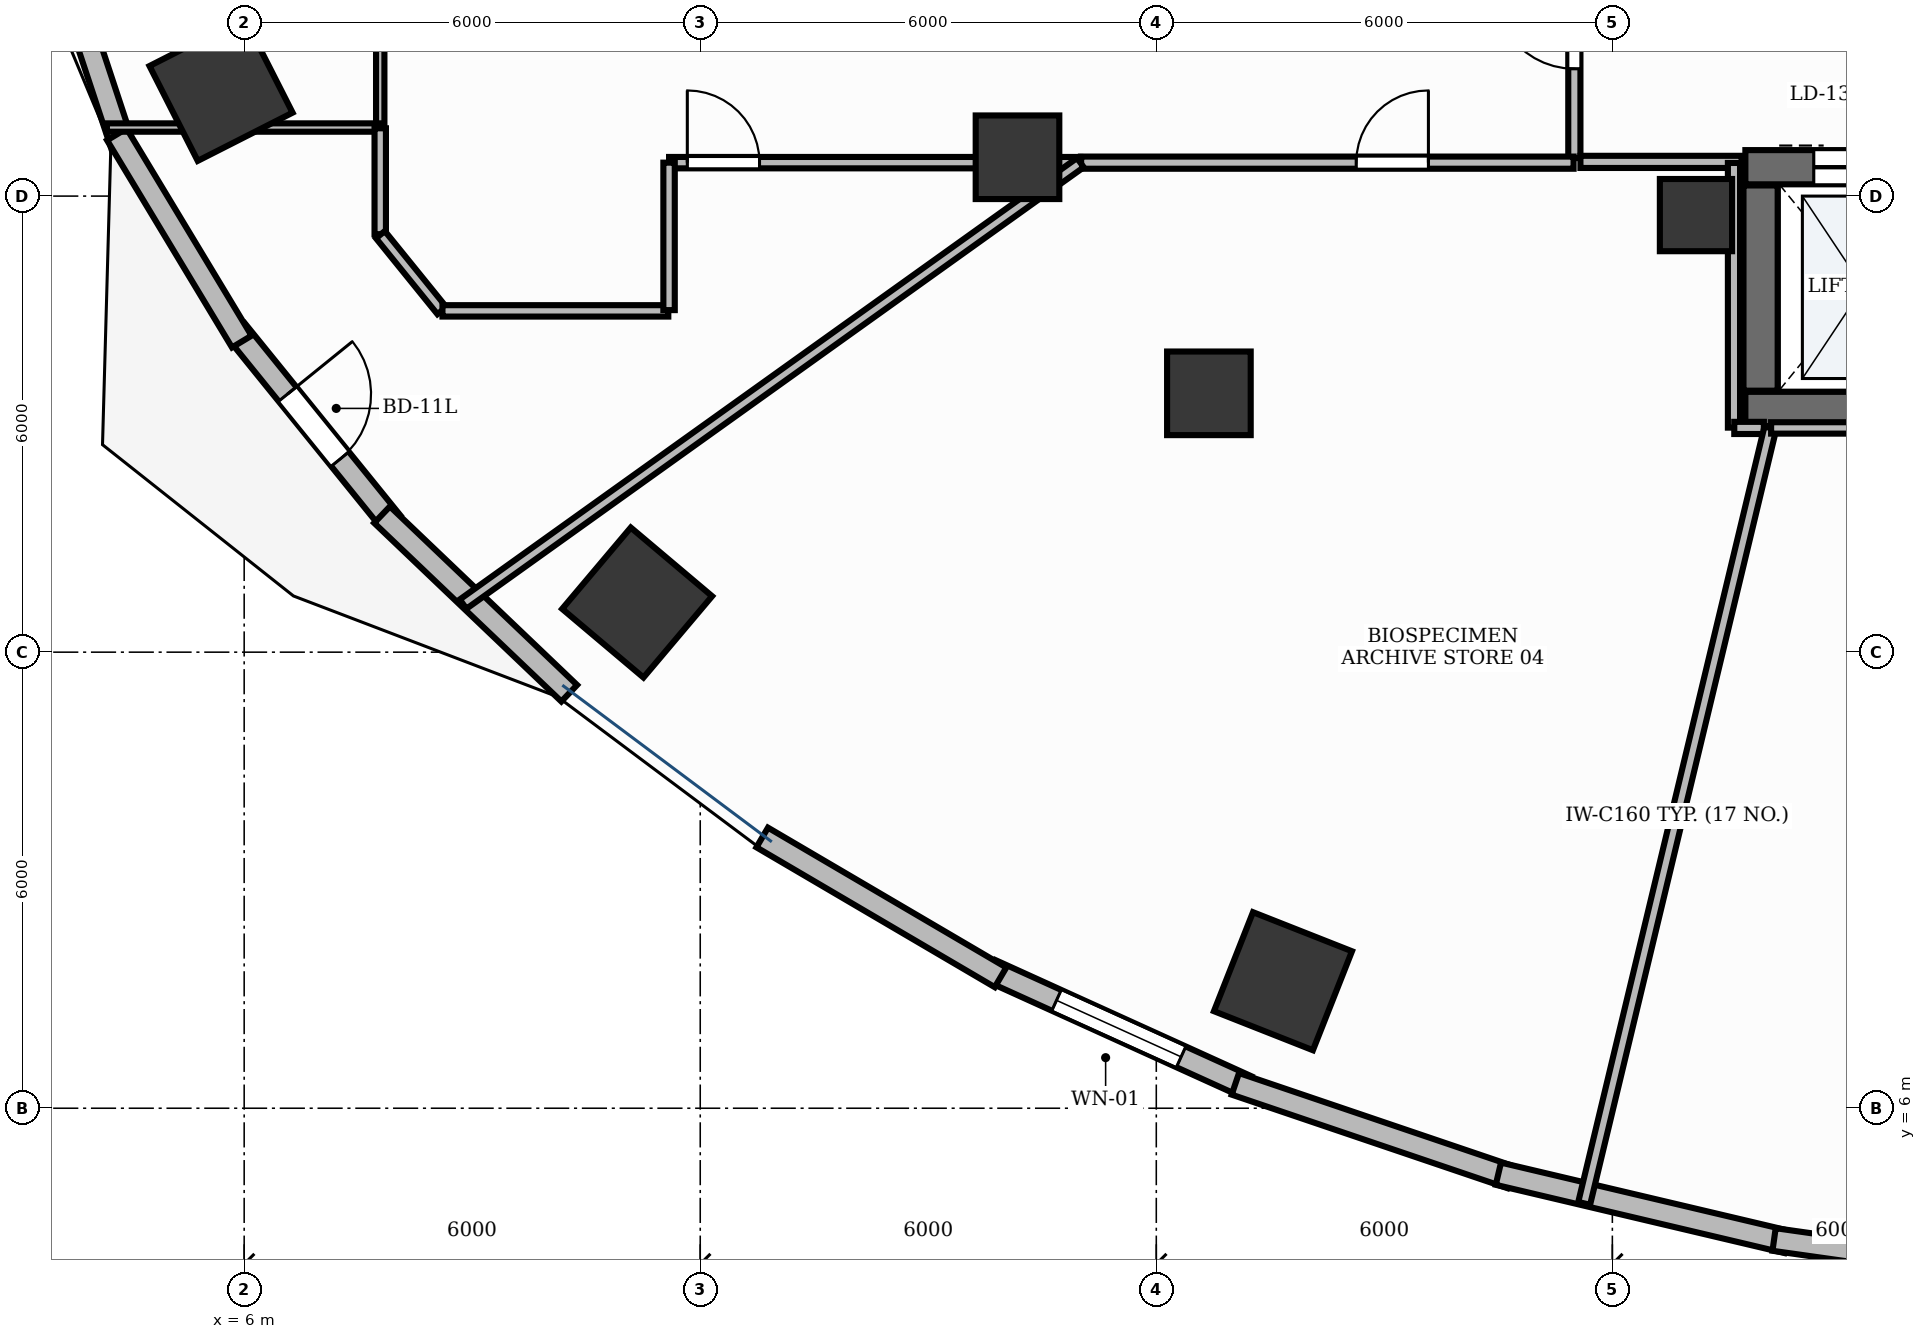
"""IFC4 building model, lengths in metres.
Left out: names, types, materials, properties, quantities, classifications, styles, units other than length and angle.
Written with IfcOpenShell. Run it as: python <this file> out.ifc"""

import sys

from ifc_helpers import new_model, si_unit, direction, frame, frame_2d, origin, origin_2d, place, context, subcontext, project, spatial, rectangle, extrude, element, fill, save


model = new_model("IFC4")
c1 = context("Model", 3, precision=1e-05, world=origin(), true_north=direction((0.0, 1.0)))
c2 = subcontext(c1, "Body", "Model", "MODEL_VIEW")
j1 = project(units=[si_unit("LENGTHUNIT", "METRE"), si_unit("PLANEANGLEUNIT", "RADIAN")], contexts=[c1])
p1 = place(None, origin())
s1 = spatial("IfcSite", under=j1, at=p1, CompositionType="ELEMENT")
p2 = place(p1, origin())
s2 = spatial("IfcBuilding", under=s1, at=p2, CompositionType="ELEMENT")
p3 = place(p2, frame((0.0, 0.0, 30.0)))
s3 = spatial("IfcBuildingStorey", under=s2, at=p3, CompositionType="ELEMENT", Elevation=30.0)
p4 = place(p3, frame((25.75, 15.2, 0.0), z_axis=(0.0, 0.0, 1.0), x_axis=(1.0, 0.0, 0.0)))
e1 = element("IfcWall", 1, at=p4, inside=s3, PredefinedType="SHEAR", context=c2, shape_type="SweptSolid", body=[
    extrude(rectangle(XDim=3.1, YDim=0.45, at=frame_2d((1.55, 0.0))), origin(), (0.0, 0.0, 1.0), 3.9),
])
p5 = place(p3, frame((25.75, 18.38, 0.0), z_axis=(0.0, 0.0, 1.0), x_axis=(1.0, 0.0, 0.0)))
e2 = element("IfcWall", 2, at=p5, inside=s3, PredefinedType="SHEAR", context=c2, shape_type="SweptSolid", body=[
    extrude(rectangle(XDim=3.1, YDim=0.45, at=frame_2d((1.55, 0.0))), origin(), (0.0, 0.0, 1.0), 3.9),
])
p6 = place(p5, frame((0.9, 0.0, 0.0)))
e3 = element("IfcOpeningElement", 3, at=p6, cuts=e2, PredefinedType="OPENING", context=c2, shape_type="SweptSolid", body=[
    extrude(rectangle(XDim=1.3, YDim=2.2, at=frame_2d((0.65, 1.1))), frame((0.0, 0.24, 0.0), z_axis=(0.0, -1.0, 0.0), x_axis=(1.0, 0.0, 0.0)), (0.0, 0.0, 1.0), 0.48),
])
p7 = place(p3, frame((25.95, 15.44, 0.0), z_axis=(0.0, 0.0, 1.0), x_axis=(0.0, 1.0, 0.0)))
e4 = element("IfcWall", 4, at=p7, inside=s3, PredefinedType="SHEAR", context=c2, shape_type="SweptSolid", body=[
    extrude(rectangle(XDim=2.7, YDim=0.45, at=frame_2d((1.35, 0.0))), origin(), (0.0, 0.0, 1.0), 3.9),
])
p8 = place(p3, frame((25.1, 17.75, -0.0), z_axis=(0.0, 0.0, 1.0), x_axis=(1.0, 0.0, 0.0)))
e5 = element("IfcColumn", 5, at=p8, inside=s3, PredefinedType="PILASTER", context=c2, shape_type="SweptSolid", body=[
    extrude(rectangle(XDim=0.95, YDim=0.95, at=origin_2d()), origin(), (0.0, 0.0, 1.0), 3.901),
])
p9 = place(p3, frame((5.696, 19.404, -0.0), z_axis=(0.0, 0.0, 1.0), x_axis=(-0.453057191132, 0.891481453292, 0.0)))
e6 = element("IfcColumn", 6, at=p9, inside=s3, PredefinedType="COLUMN", context=c2, shape_type="SweptSolid", body=[
    extrude(rectangle(XDim=1.4, YDim=1.4, at=origin_2d()), origin(), (0.0, 0.0, 1.0), 3.901),
])
p10 = place(p3, frame((16.174, 18.511, -0.0), z_axis=(0.0, 0.0, 1.0), x_axis=(1.0, 0.0, 0.0)))
e7 = element("IfcColumn", 7, at=p10, inside=s3, PredefinedType="COLUMN", context=c2, shape_type="SweptSolid", body=[
    extrude(rectangle(XDim=1.1, YDim=1.1, at=origin_2d()), origin(), (0.0, 0.0, 1.0), 3.901),
])
p11 = place(p3, frame((11.17, 12.653, -0.0), z_axis=(0.0, 0.0, 1.0), x_axis=(-0.764246456939, 0.644924300253, 0.0)))
e8 = element("IfcColumn", 8, at=p11, inside=s3, PredefinedType="COLUMN", context=c2, shape_type="SweptSolid", body=[
    extrude(rectangle(XDim=1.4, YDim=1.4, at=origin_2d()), origin(), (0.0, 0.0, 1.0), 3.901),
])
p12 = place(p3, frame((18.692, 15.405, -0.0), z_axis=(0.0, 0.0, 1.0), x_axis=(1.0, 0.0, 0.0)))
e9 = element("IfcColumn", 9, at=p12, inside=s3, PredefinedType="COLUMN", context=c2, shape_type="SweptSolid", body=[
    extrude(rectangle(XDim=1.1, YDim=1.1, at=origin_2d()), origin(), (0.0, 0.0, 1.0), 3.901),
])
p13 = place(p3, frame((19.667, 7.671, -0.0), z_axis=(0.0, 0.0, 1.0), x_axis=(-0.930225540858, 0.366988341962, 0.0)))
e10 = element("IfcColumn", 10, at=p13, inside=s3, PredefinedType="COLUMN", context=c2, shape_type="SweptSolid", body=[
    extrude(rectangle(XDim=1.4, YDim=1.4, at=origin_2d()), origin(), (0.0, 0.0, 1.0), 3.901),
])
p14 = place(p3, frame((5.894, 16.23, 0.0), z_axis=(0.0, 0.0, 1.0), x_axis=(0.629295540187, -0.777166084631, 0.0)))
e11 = element("IfcWall", 11, at=p14, inside=s3, PredefinedType="STANDARD", context=c2, shape_type="SweptSolid", body=[
    extrude(rectangle(XDim=3.248, YDim=0.3, at=frame_2d((1.624, 0.0))), origin(), (0.0, 0.0, 1.0), 3.9),
])
p15 = place(p14, frame((1.074, 0.0, 0.0)))
e12 = element("IfcOpeningElement", 12, at=p15, cuts=e11, PredefinedType="OPENING", context=c2, shape_type="SweptSolid", body=[
    extrude(rectangle(XDim=1.1, YDim=2.15, at=frame_2d((0.55, 1.075))), frame((0.0, 0.165, 0.0), z_axis=(0.0, -1.0, 0.0), x_axis=(1.0, 0.0, 0.0)), (0.0, 0.0, 1.0), 0.33),
])
p16 = place(p3, frame((15.822, 7.812, 0.0), z_axis=(0.0, 0.0, 1.0), x_axis=(0.910608120407, -0.413270917254, 0.0)))
e13 = element("IfcWall", 13, at=p16, inside=s3, PredefinedType="STANDARD", context=c2, shape_type="SweptSolid", body=[
    extrude(rectangle(XDim=3.7, YDim=0.3, at=frame_2d((1.85, 0.0))), origin(), (0.0, 0.0, 1.0), 3.47),
])
p17 = place(p16, frame((0.95, 0.0, 0.9)))
e14 = element("IfcOpeningElement", 14, at=p17, cuts=e13, PredefinedType="OPENING", context=c2, shape_type="SweptSolid", body=[
    extrude(rectangle(XDim=1.8, YDim=2.1, at=frame_2d((0.9, 1.05))), frame((0.0, 0.165, 0.0), z_axis=(0.0, -1.0, 0.0), x_axis=(1.0, 0.0, 0.0)), (0.0, 0.0, 1.0), 0.33),
])
p18 = place(p3, frame((2.537, 24.289, 0.0), z_axis=(0.0, 0.0, 1.0), x_axis=(0.31372816724, -0.949512841978, 0.0)))
e15 = element("IfcWall", 15, at=p18, inside=s3, PredefinedType="STANDARD", context=c2, shape_type="SweptSolid", body=[
    extrude(rectangle(XDim=5.951, YDim=0.3, at=frame_2d((2.976, 0.0))), origin(), (0.0, 0.0, 1.0), 3.9),
])
p19 = place(p3, frame((4.325, 18.812, 0.0), z_axis=(0.0, 0.0, 1.0), x_axis=(0.516423528484, -0.856333310825, 0.0)))
e16 = element("IfcWall", 16, at=p19, inside=s3, PredefinedType="STANDARD", context=c2, shape_type="SweptSolid", body=[
    extrude(rectangle(XDim=3.183, YDim=0.3, at=frame_2d((1.591, 0.0))), origin(), (0.0, 0.0, 1.0), 3.9),
])
p20 = place(p3, frame((7.814, 13.808, 0.0), z_axis=(0.0, 0.0, 1.0), x_axis=(0.72369587847, -0.69011902994, 0.0)))
e17 = element("IfcWall", 17, at=p20, inside=s3, PredefinedType="STANDARD", context=c2, shape_type="SweptSolid", body=[
    extrude(rectangle(XDim=3.403, YDim=0.3, at=frame_2d((1.701, 0.0))), origin(), (0.0, 0.0, 1.0), 3.9),
])
p21 = place(p3, frame((12.815, 9.562, 0.0), z_axis=(0.0, 0.0, 1.0), x_axis=(0.8624654944, -0.506115867139, 0.0)))
e18 = element("IfcWall", 18, at=p21, inside=s3, PredefinedType="STANDARD", context=c2, shape_type="SweptSolid", body=[
    extrude(rectangle(XDim=3.635, YDim=0.3, at=frame_2d((1.818, 0.0))), origin(), (0.0, 0.0, 1.0), 3.9),
])
p22 = place(p3, frame((19.04, 6.321, 0.0), z_axis=(0.0, 0.0, 1.0), x_axis=(0.94702579403, -0.321157508773, 0.0)))
e19 = element("IfcWall", 19, at=p22, inside=s3, PredefinedType="STANDARD", context=c2, shape_type="SweptSolid", body=[
    extrude(rectangle(XDim=3.83, YDim=0.3, at=frame_2d((1.915, 0.0))), origin(), (0.0, 0.0, 1.0), 3.9),
])
p23 = place(p3, frame((22.5, 5.138, 0.0), z_axis=(0.0, 0.0, 1.0), x_axis=(0.973197600754, -0.229970497863, 0.0)))
e20 = element("IfcWall", 20, at=p23, inside=s3, PredefinedType="STANDARD", context=c2, shape_type="SweptSolid", body=[
    extrude(rectangle(XDim=3.901, YDim=0.3, at=frame_2d((1.951, 0.0))), origin(), (0.0, 0.0, 1.0), 3.9),
])
p24 = place(p3, frame((26.128, 4.273, 0.0), z_axis=(0.0, 0.0, 1.0), x_axis=(0.990165832998, -0.139898617443, 0.0)))
e21 = element("IfcWall", 21, at=p24, inside=s3, PredefinedType="STANDARD", context=c2, shape_type="SweptSolid", body=[
    extrude(rectangle(XDim=3.951, YDim=0.3, at=frame_2d((1.976, 0.0))), origin(), (0.0, 0.0, 1.0), 3.9),
])
p25 = place(p3, frame((23.5, 18.5, 0.0), z_axis=(0.0, 0.0, 1.0), x_axis=(0.0, 1.0, 0.0)))
e22 = element("IfcWall", 22, at=p25, inside=s3, PredefinedType="PARTITIONING", context=c2, shape_type="SweptSolid", body=[
    extrude(rectangle(XDim=3.4, YDim=0.16, at=frame_2d((1.7, 0.0))), origin(), (0.0, 0.0, 1.0), 2.91),
])
p26 = place(p25, frame((1.175, 0.0, 0.0)))
e23 = element("IfcOpeningElement", 23, at=p26, cuts=e22, PredefinedType="OPENING", context=c2, shape_type="SweptSolid", body=[
    extrude(rectangle(XDim=1.05, YDim=2.15, at=frame_2d((0.525, 1.075))), frame((0.0, 0.095, 0.0), z_axis=(0.0, -1.0, 0.0), x_axis=(1.0, 0.0, 0.0)), (0.0, 0.0, 1.0), 0.19),
])
p27 = place(p3, frame((23.58, 18.45, 0.0), z_axis=(0.0, 0.0, 1.0), x_axis=(1.0, 0.0, 0.0)))
e24 = element("IfcWall", 24, at=p27, inside=s3, PredefinedType="PARTITIONING", context=c2, shape_type="SweptSolid", body=[
    extrude(rectangle(XDim=2.12, YDim=0.16, at=frame_2d((1.06, 0.0))), origin(), (0.0, 0.0, 1.0), 2.91),
])
p28 = place(p3, frame((7.79, 28.013, 0.0), z_axis=(0.0, 0.0, 1.0), x_axis=(0.0, -1.0, 0.0)))
e25 = element("IfcWall", 25, at=p28, inside=s3, PredefinedType="MOVABLE", context=c2, shape_type="SweptSolid", body=[
    extrude(rectangle(XDim=9.111, YDim=0.11, at=frame_2d((4.555, 0.0))), origin(), (0.0, 0.0, 1.0), 2.91),
])
p29 = place(p28, frame((1.273, 0.0, 0.0)))
e26 = element("IfcOpeningElement", 26, at=p29, cuts=e25, PredefinedType="OPENING", context=c2, shape_type="SweptSolid", body=[
    extrude(rectangle(XDim=0.95, YDim=2.15, at=frame_2d((0.475, 1.075))), frame((0.0, 0.07, 0.0), z_axis=(0.0, -1.0, 0.0), x_axis=(1.0, 0.0, 0.0)), (0.0, 0.0, 1.0), 0.14),
])
p30 = place(p3, frame((11.59, 18.44, 0.0), z_axis=(0.0, 0.0, 1.0), x_axis=(1.0, 0.0, 0.0)))
e27 = element("IfcWall", 27, at=p30, inside=s3, PredefinedType="PARTITIONING", context=c2, shape_type="SweptSolid", body=[
    extrude(rectangle(XDim=5.411, YDim=0.15, at=frame_2d((2.706, 0.0))), origin(), (0.0, 0.0, 1.0), 2.91),
])
p31 = place(p30, frame((0.24, 0.0, 0.0)))
e28 = element("IfcOpeningElement", 28, at=p31, cuts=e27, PredefinedType="OPENING", context=c2, shape_type="SweptSolid", body=[
    extrude(rectangle(XDim=0.95, YDim=2.15, at=frame_2d((0.475, 1.075))), frame((0.0, 0.09, 0.0), z_axis=(0.0, -1.0, 0.0), x_axis=(1.0, 0.0, 0.0)), (0.0, 0.0, 1.0), 0.18),
])
p32 = place(p3, frame((17.011, 18.44, 0.0), z_axis=(0.0, 0.0, 1.0), x_axis=(1.0, 0.0, 0.0)))
e29 = element("IfcWall", 29, at=p32, inside=s3, PredefinedType="PARTITIONING", context=c2, shape_type="SweptSolid", body=[
    extrude(rectangle(XDim=6.479, YDim=0.16, at=frame_2d((3.24, 0.0))), origin(), (0.0, 0.0, 1.0), 2.91),
])
p33 = place(p32, frame((3.619, 0.0, 0.0)))
e30 = element("IfcOpeningElement", 30, at=p33, cuts=e29, PredefinedType="OPENING", context=c2, shape_type="SweptSolid", body=[
    extrude(rectangle(XDim=0.95, YDim=2.15, at=frame_2d((0.475, 1.075))), frame((0.0, 0.095, 0.0), z_axis=(0.0, -1.0, 0.0), x_axis=(1.0, 0.0, 0.0)), (0.0, 0.0, 1.0), 0.19),
])
p34 = place(p3, frame((7.79, 18.902, 0.0), z_axis=(0.0, 0.0, 1.0), x_axis=(-1.0, 0.0, 0.0)))
e31 = element("IfcWall", 31, at=p34, inside=s3, PredefinedType="MOVABLE", context=c2, shape_type="SweptSolid", body=[
    extrude(rectangle(XDim=3.596, YDim=0.11, at=frame_2d((1.798, 0.0))), origin(), (0.0, 0.0, 1.0), 2.91),
])
p35 = place(p3, frame((7.79, 18.892, 0.0), z_axis=(0.0, 0.0, 1.0), x_axis=(0.0, -1.0, 0.0)))
e32 = element("IfcWall", 32, at=p35, inside=s3, PredefinedType="PARTITIONING", context=c2, shape_type="SweptSolid", body=[
    extrude(rectangle(XDim=1.393, YDim=0.15, at=frame_2d((0.697, 0.0))), origin(), (0.0, 0.0, 1.0), 2.91),
])
p36 = place(p3, frame((7.792, 17.492, 0.0), z_axis=(0.0, 0.0, 1.0), x_axis=(0.629225554682, -0.777222748854, 0.0)))
e33 = element("IfcWall", 33, at=p36, inside=s3, PredefinedType="PARTITIONING", context=c2, shape_type="SweptSolid", body=[
    extrude(rectangle(XDim=1.285, YDim=0.15, at=frame_2d((0.643, 0.0))), origin(), (0.0, 0.0, 1.0), 2.91),
])
p37 = place(p3, frame((8.609, 16.49, 0.0), z_axis=(0.0, 0.0, 1.0), x_axis=(1.0, 0.0, 0.0)))
e34 = element("IfcWall", 34, at=p37, inside=s3, PredefinedType="PARTITIONING", context=c2, shape_type="SweptSolid", body=[
    extrude(rectangle(XDim=2.971, YDim=0.15, at=frame_2d((1.486, 0.0))), origin(), (0.0, 0.0, 1.0), 2.91),
])
p38 = place(p3, frame((11.59, 16.5, 0.0), z_axis=(0.0, 0.0, 1.0), x_axis=(0.0, 1.0, 0.0)))
e35 = element("IfcWall", 35, at=p38, inside=s3, PredefinedType="PARTITIONING", context=c2, shape_type="SweptSolid", body=[
    extrude(rectangle(XDim=1.94, YDim=0.15, at=frame_2d((0.97, 0.0))), origin(), (0.0, 0.0, 1.0), 2.91),
])
p39 = place(p3, frame((17.001, 18.44, 0.0), z_axis=(0.0, 0.0, 1.0), x_axis=(-0.813397935838, -0.581707656796, 0.0)))
e36 = element("IfcWall", 36, at=p39, inside=s3, PredefinedType="PARTITIONING", context=c2, shape_type="SweptSolid", body=[
    extrude(rectangle(XDim=9.984, YDim=0.15, at=frame_2d((4.992, 0.0))), origin(), (0.0, 0.0, 1.0), 2.91),
])
p40 = place(p3, frame((25.6, 18.436, 0.0), z_axis=(0.0, 0.0, 1.0), x_axis=(0.0, -1.0, 0.0)))
e37 = element("IfcWall", 37, at=p40, inside=s3, PredefinedType="PARTITIONING", context=c2, shape_type="SweptSolid", body=[
    extrude(rectangle(XDim=3.482, YDim=0.16, at=frame_2d((1.741, 0.0))), origin(), (0.0, 0.0, 1.0), 2.91),
])
p41 = place(p3, frame((25.604, 14.95, 0.0), z_axis=(0.0, 0.0, 1.0), x_axis=(1.0, 0.0, 0.0)))
e38 = element("IfcWall", 38, at=p41, inside=s3, PredefinedType="PARTITIONING", context=c2, shape_type="SweptSolid", body=[
    extrude(rectangle(XDim=0.389, YDim=0.16, at=frame_2d((0.195, 0.0))), origin(), (0.0, 0.0, 1.0), 2.91),
])
p42 = place(p3, frame((26.079, 14.95, 0.0), z_axis=(0.0, 0.0, 1.0), x_axis=(-0.233446881406, -0.972369556065, 0.0)))
e39 = element("IfcWall", 39, at=p42, inside=s3, PredefinedType="PARTITIONING", context=c2, shape_type="SweptSolid", body=[
    extrude(rectangle(XDim=10.491, YDim=0.16, at=frame_2d((5.246, 0.0))), origin(), (0.0, 0.0, 1.0), 2.91),
])
p43 = place(p3, frame((26.089, 14.95, 0.0), z_axis=(0.0, 0.0, 1.0), x_axis=(1.0, 0.0, 0.0)))
e40 = element("IfcWall", 40, at=p43, inside=s3, PredefinedType="PARTITIONING", context=c2, shape_type="SweptSolid", body=[
    extrude(rectangle(XDim=2.907, YDim=0.15, at=frame_2d((1.454, 0.0))), origin(), (0.0, 0.0, 1.0), 2.91),
])
p44 = place(p15, origin())
e41 = element("IfcDoor", 41, at=p44, inside=s3, OperationType="SINGLE_SWING_LEFT", PredefinedType="DOOR", context=c2, shape_type="SweptSolid", body=[
    extrude(rectangle(XDim=1.1, YDim=2.15, at=frame_2d((0.55, 1.075))), frame((0.0, 0.025, 0.0), z_axis=(0.0, -1.0, 0.0), x_axis=(1.0, 0.0, 0.0)), (0.0, 0.0, 1.0), 0.05),
])
fill(e12, e41)
p45 = place(p17, origin())
e42 = element("IfcWindow", 42, at=p45, inside=s3, PartitioningType="SINGLE_PANEL", PredefinedType="WINDOW", context=c2, shape_type="SweptSolid", body=[
    extrude(rectangle(XDim=1.8, YDim=2.1, at=frame_2d((0.9, 1.05))), frame((0.0, 0.03, 0.0), z_axis=(0.0, -1.0, 0.0), x_axis=(1.0, 0.0, 0.0)), (0.0, 0.0, 1.0), 0.06),
])
fill(e14, e42)
p46 = place(p6, origin())
e43 = element("IfcDoor", 43, at=p46, inside=s3, OperationType="DOUBLE_DOOR_SLIDING", PredefinedType="DOOR", context=c2, shape_type="SweptSolid", body=[
    extrude(rectangle(XDim=1.3, YDim=2.2, at=frame_2d((0.65, 1.1))), frame((0.0, 0.025, 0.0), z_axis=(0.0, -1.0, 0.0), x_axis=(1.0, 0.0, 0.0)), (0.0, 0.0, 1.0), 0.05),
])
fill(e3, e43)
p47 = place(p26, origin())
e44 = element("IfcDoor", 44, at=p47, inside=s3, OperationType="SINGLE_SWING_RIGHT", PredefinedType="DOOR", context=c2, shape_type="SweptSolid", body=[
    extrude(rectangle(XDim=1.05, YDim=2.15, at=frame_2d((0.525, 1.075))), frame((0.0, 0.025, 0.0), z_axis=(0.0, -1.0, 0.0), x_axis=(1.0, 0.0, 0.0)), (0.0, 0.0, 1.0), 0.05),
])
fill(e23, e44)
p48 = place(p31, origin())
e45 = element("IfcDoor", 45, at=p48, inside=s3, OperationType="SINGLE_SWING_LEFT", PredefinedType="DOOR", context=c2, shape_type="SweptSolid", body=[
    extrude(rectangle(XDim=0.95, YDim=2.15, at=frame_2d((0.475, 1.075))), frame((0.0, 0.025, 0.0), z_axis=(0.0, -1.0, 0.0), x_axis=(1.0, 0.0, 0.0)), (0.0, 0.0, 1.0), 0.05),
])
fill(e28, e45)
p49 = place(p33, origin())
e46 = element("IfcDoor", 46, at=p49, inside=s3, OperationType="SINGLE_SWING_RIGHT", PredefinedType="DOOR", context=c2, shape_type="SweptSolid", body=[
    extrude(rectangle(XDim=0.95, YDim=2.15, at=frame_2d((0.475, 1.075))), frame((0.0, 0.025, 0.0), z_axis=(0.0, -1.0, 0.0), x_axis=(1.0, 0.0, 0.0)), (0.0, 0.0, 1.0), 0.05),
])
fill(e30, e46)
save(model, sys.argv[1])
